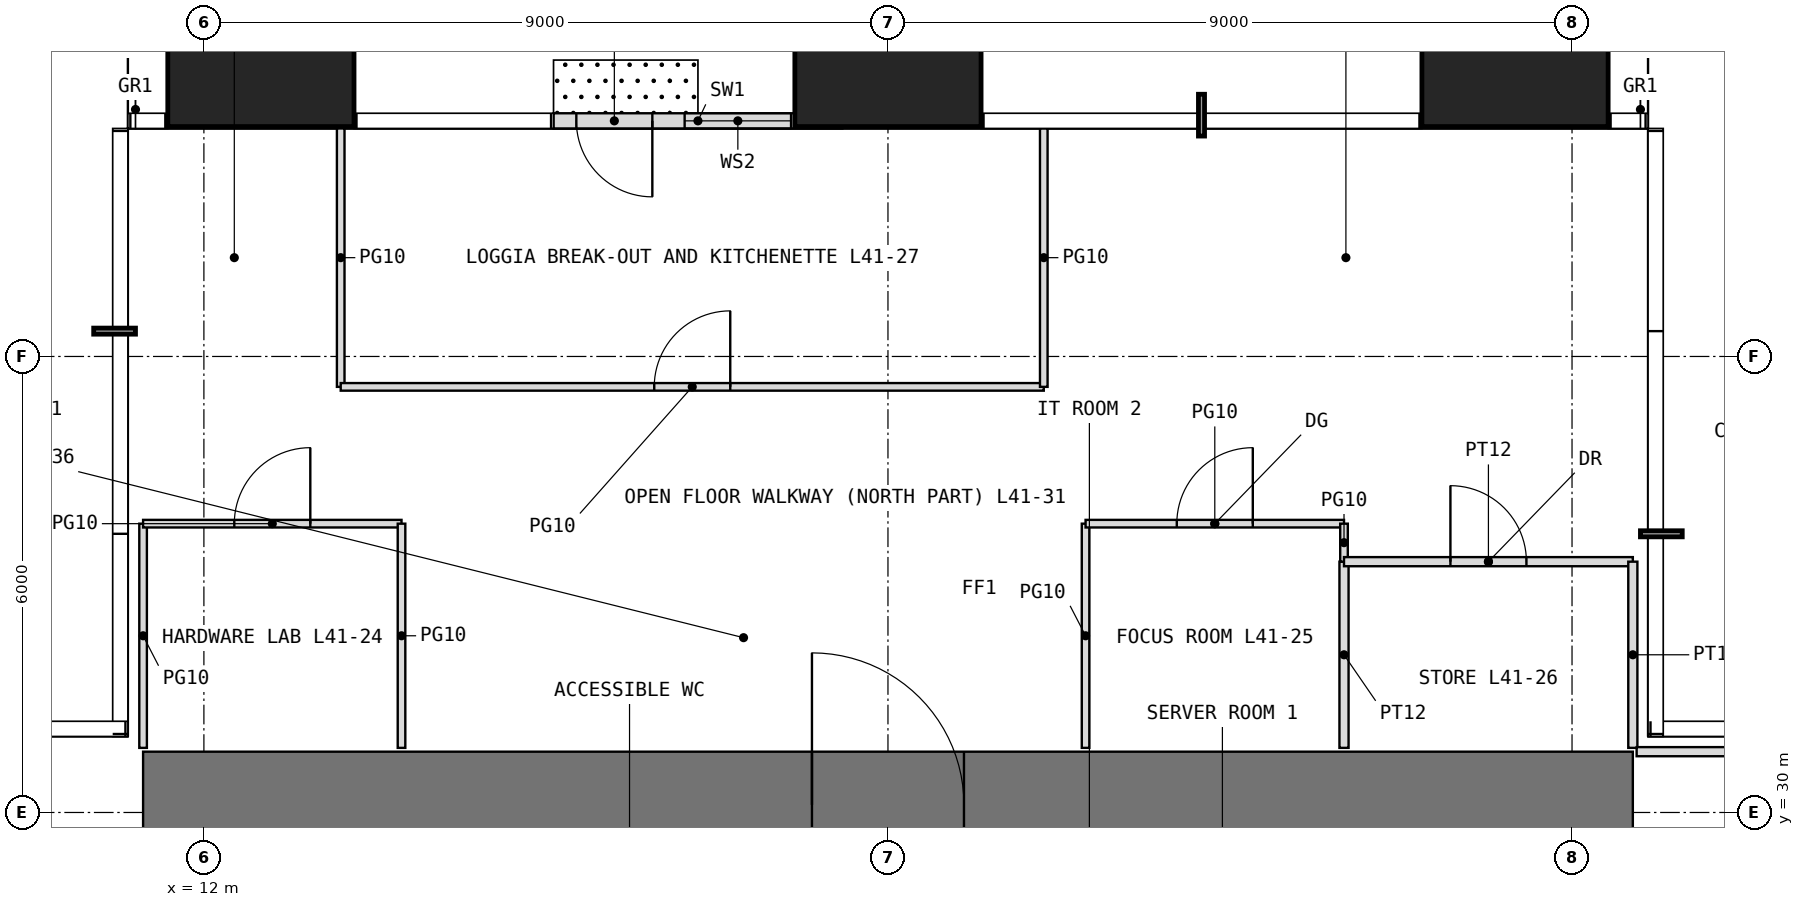
"""IFC4 building model, lengths in metres.
Left out: names, types, materials, properties, quantities, classifications, styles, units other than length and angle.
Written with IfcOpenShell. Run it as: python <this file> out.ifc"""

import sys

from ifc_helpers import new_model, si_unit, direction, frame, frame_2d, origin, origin_2d, place, context, subcontext, project, spatial, rectangle, extrude, element, fill, save


model = new_model("IFC4")
c1 = context("Model", 3, precision=1e-05, world=origin(), true_north=direction((0.0, 1.0)))
c2 = subcontext(c1, "Body", "Model", "MODEL_VIEW")
j1 = project(units=[si_unit("LENGTHUNIT", "METRE"), si_unit("PLANEANGLEUNIT", "RADIAN")], contexts=[c1])
p1 = place(None, origin())
s1 = spatial("IfcSite", under=j1, at=p1, CompositionType="ELEMENT")
p2 = place(p1, origin())
s2 = spatial("IfcBuilding", under=s1, at=p2, CompositionType="ELEMENT")
p3 = place(p2, frame((0.0, 0.0, 174.5)))
s3 = spatial("IfcBuildingStorey", under=s2, at=p3, CompositionType="ELEMENT", Elevation=174.5)
for number, where, z_axis, x_axis in (
    (1, (12.75, 40.25, 0.0), (0.0, 0.0, 1.0), (1.0, 0.0, 0.0)),
    (2, (21.0, 40.25, 0.0), (0.0, 0.0, 1.0), (1.0, 0.0, 0.0)),
    (3, (29.25, 40.25, 0.0), (0.0, 0.0, 1.0), (1.0, 0.0, 0.0)),
):
    element("IfcColumn", number, at=place(p3, frame(where, z_axis=z_axis, x_axis=x_axis)), inside=s3, PredefinedType="COLUMN", context=c2, shape_type="SweptSolid", body=[
        extrude(rectangle(XDim=2.45, YDim=2.45, at=origin_2d()), origin(), (0.0, 0.0, 1.0), 4.0),
    ])
p4 = place(p3, frame((20.4, 39.1, 0.0), z_axis=(0.0, 0.0, 1.0), x_axis=(-1.0, 0.0, 0.0)))
e4 = element("IfcWall", 4, at=p4, inside=s3, PredefinedType="USERDEFINED", context=c2, shape_type="SweptSolid", body=[
    extrude(rectangle(XDim=3.8, YDim=0.2, at=frame_2d((1.9, 0.0))), origin(), (0.0, 0.0, 1.0), 3.75),
])
p5 = place(p4, frame((2.5, 0.0, 0.0)))
e5 = element("IfcOpeningElement", 5, at=p5, cuts=e4, PredefinedType="OPENING", context=c2, shape_type="SweptSolid", body=[
    extrude(rectangle(XDim=1.0, YDim=2.4, at=frame_2d((0.5, 1.2))), frame((0.0, 0.11, 0.0), z_axis=(0.0, -1.0, 0.0), x_axis=(1.0, 0.0, 0.0)), (0.0, 0.0, 1.0), 0.22),
])
p6 = place(p4, frame((0.675, 0.0, 0.3)))
e6 = element("IfcOpeningElement", 6, at=p6, cuts=e4, PredefinedType="OPENING", context=c2, shape_type="SweptSolid", body=[
    extrude(rectangle(XDim=1.4, YDim=2.7, at=frame_2d((0.7, 1.35))), frame((0.0, 0.11, 0.0), z_axis=(0.0, -1.0, 0.0), x_axis=(1.0, 0.0, 0.0)), (0.0, 0.0, 1.0), 0.22),
])
p7 = place(p3, frame((11.2, 30.1, -0.05), z_axis=(0.0, 0.0, 1.0), x_axis=(1.0, 0.0, 0.0)))
e7 = element("IfcWall", 7, at=p7, inside=s3, PredefinedType="SHEAR", context=c2, shape_type="SweptSolid", body=[
    extrude(rectangle(XDim=19.6, YDim=1.4, at=frame_2d((9.8, 0.0))), origin(), (0.0, 0.0, 1.0), 4.0),
])
p8 = place(p7, frame((8.8, 0.0, 0.05)))
e8 = element("IfcOpeningElement", 8, at=p8, cuts=e7, PredefinedType="OPENING", context=c2, shape_type="SweptSolid", body=[
    extrude(rectangle(XDim=2.0, YDim=2.2, at=frame_2d((1.0, 1.1))), frame((0.0, 0.71, 0.0), z_axis=(0.0, -1.0, 0.0), x_axis=(1.0, 0.0, 0.0)), (0.0, 0.0, 1.0), 1.42),
])
p9 = place(p3, frame((11.2, 30.85, 0.0), z_axis=(0.0, 0.0, 1.0), x_axis=(0.0, 1.0, 0.0)))
e9 = element("IfcWall", 9, at=p9, inside=s3, PredefinedType="PARTITIONING", context=c2, shape_type="SweptSolid", body=[
    extrude(rectangle(XDim=2.95, YDim=0.1, at=frame_2d((1.475, 0.0))), origin(), (0.0, 0.0, 1.0), 3.75),
])
p10 = place(p3, frame((11.2, 33.8, 0.0), z_axis=(0.0, 0.0, 1.0), x_axis=(1.0, 0.0, 0.0)))
e10 = element("IfcWall", 10, at=p10, inside=s3, PredefinedType="PARTITIONING", context=c2, shape_type="SweptSolid", body=[
    extrude(rectangle(XDim=3.4, YDim=0.1, at=frame_2d((1.7, 0.0))), origin(), (0.0, 0.0, 1.0), 3.75),
])
p11 = place(p10, frame((1.2, 0.0, 0.0)))
e11 = element("IfcOpeningElement", 11, at=p11, cuts=e10, PredefinedType="OPENING", context=c2, shape_type="SweptSolid", body=[
    extrude(rectangle(XDim=1.0, YDim=2.4, at=frame_2d((0.5, 1.2))), frame((0.0, 0.06, 0.0), z_axis=(0.0, -1.0, 0.0), x_axis=(1.0, 0.0, 0.0)), (0.0, 0.0, 1.0), 0.12),
])
p12 = place(p3, frame((13.8, 35.6, 0.0), z_axis=(0.0, 0.0, 1.0), x_axis=(0.0, 1.0, 0.0)))
e12 = element("IfcWall", 12, at=p12, inside=s3, PredefinedType="PARTITIONING", context=c2, shape_type="SweptSolid", body=[
    extrude(rectangle(XDim=3.4, YDim=0.1, at=frame_2d((1.7, 0.0))), origin(), (0.0, 0.0, 1.0), 3.75),
])
p13 = place(p3, frame((13.8, 35.6, 0.0), z_axis=(0.0, 0.0, 1.0), x_axis=(1.0, 0.0, 0.0)))
e13 = element("IfcWall", 13, at=p13, inside=s3, PredefinedType="PARTITIONING", context=c2, shape_type="SweptSolid", body=[
    extrude(rectangle(XDim=9.25, YDim=0.1, at=frame_2d((4.625, 0.0))), origin(), (0.0, 0.0, 1.0), 3.75),
])
p14 = place(p13, frame((4.125, 0.0, 0.0)))
e14 = element("IfcOpeningElement", 14, at=p14, cuts=e13, PredefinedType="OPENING", context=c2, shape_type="SweptSolid", body=[
    extrude(rectangle(XDim=1.0, YDim=2.4, at=frame_2d((0.5, 1.2))), frame((0.0, 0.06, 0.0), z_axis=(0.0, -1.0, 0.0), x_axis=(1.0, 0.0, 0.0)), (0.0, 0.0, 1.0), 0.12),
])
p15 = place(p3, frame((14.6, 30.85, 0.0), z_axis=(0.0, 0.0, 1.0), x_axis=(0.0, 1.0, 0.0)))
e15 = element("IfcWall", 15, at=p15, inside=s3, PredefinedType="PARTITIONING", context=c2, shape_type="SweptSolid", body=[
    extrude(rectangle(XDim=2.95, YDim=0.1, at=frame_2d((1.475, 0.0))), origin(), (0.0, 0.0, 1.0), 3.75),
])
p16 = place(p3, frame((23.05, 35.6, 0.0), z_axis=(0.0, 0.0, 1.0), x_axis=(0.0, 1.0, 0.0)))
e16 = element("IfcWall", 16, at=p16, inside=s3, PredefinedType="PARTITIONING", context=c2, shape_type="SweptSolid", body=[
    extrude(rectangle(XDim=3.4, YDim=0.1, at=frame_2d((1.7, 0.0))), origin(), (0.0, 0.0, 1.0), 3.75),
])
p17 = place(p3, frame((23.6, 30.85, 0.0), z_axis=(0.0, 0.0, 1.0), x_axis=(0.0, 1.0, 0.0)))
e17 = element("IfcWall", 17, at=p17, inside=s3, PredefinedType="PARTITIONING", context=c2, shape_type="SweptSolid", body=[
    extrude(rectangle(XDim=2.95, YDim=0.1, at=frame_2d((1.475, 0.0))), origin(), (0.0, 0.0, 1.0), 3.75),
])
p18 = place(p3, frame((23.6, 33.8, 0.0), z_axis=(0.0, 0.0, 1.0), x_axis=(1.0, 0.0, 0.0)))
e18 = element("IfcWall", 18, at=p18, inside=s3, PredefinedType="PARTITIONING", context=c2, shape_type="SweptSolid", body=[
    extrude(rectangle(XDim=3.4, YDim=0.1, at=frame_2d((1.7, 0.0))), origin(), (0.0, 0.0, 1.0), 3.75),
])
p19 = place(p18, frame((1.2, 0.0, 0.0)))
e19 = element("IfcOpeningElement", 19, at=p19, cuts=e18, PredefinedType="OPENING", context=c2, shape_type="SweptSolid", body=[
    extrude(rectangle(XDim=1.0, YDim=2.4, at=frame_2d((0.5, 1.2))), frame((0.0, 0.06, 0.0), z_axis=(0.0, -1.0, 0.0), x_axis=(1.0, 0.0, 0.0)), (0.0, 0.0, 1.0), 0.12),
])
p20 = place(p3, frame((27.0, 30.85, 0.0), z_axis=(0.0, 0.0, 1.0), x_axis=(0.0, 1.0, 0.0)))
e20 = element("IfcWall", 20, at=p20, inside=s3, PredefinedType="PARTITIONING", context=c2, shape_type="SweptSolid", body=[
    extrude(rectangle(XDim=2.45, YDim=0.12, at=frame_2d((1.225, 0.0))), origin(), (0.0, 0.0, 1.0), 3.75),
])
p21 = place(p3, frame((27.0, 33.3, 0.0), z_axis=(0.0, 0.0, 1.0), x_axis=(0.0, 1.0, 0.0)))
e21 = element("IfcWall", 21, at=p21, inside=s3, PredefinedType="PARTITIONING", context=c2, shape_type="SweptSolid", body=[
    extrude(rectangle(XDim=0.5, YDim=0.1, at=frame_2d((0.25, 0.0))), origin(), (0.0, 0.0, 1.0), 3.75),
])
p22 = place(p3, frame((27.0, 33.3, 0.0), z_axis=(0.0, 0.0, 1.0), x_axis=(1.0, 0.0, 0.0)))
e22 = element("IfcWall", 22, at=p22, inside=s3, PredefinedType="PARTITIONING", context=c2, shape_type="SweptSolid", body=[
    extrude(rectangle(XDim=3.8, YDim=0.12, at=frame_2d((1.9, 0.0))), origin(), (0.0, 0.0, 1.0), 3.75),
])
p23 = place(p22, frame((1.4, 0.0, 0.0)))
e23 = element("IfcOpeningElement", 23, at=p23, cuts=e22, PredefinedType="OPENING", context=c2, shape_type="SweptSolid", body=[
    extrude(rectangle(XDim=1.0, YDim=2.2, at=frame_2d((0.5, 1.1))), frame((0.0, 0.07, 0.0), z_axis=(0.0, -1.0, 0.0), x_axis=(1.0, 0.0, 0.0)), (0.0, 0.0, 1.0), 0.14),
])
p24 = place(p3, frame((30.8, 30.85, 0.0), z_axis=(0.0, 0.0, 1.0), x_axis=(0.0, 1.0, 0.0)))
e24 = element("IfcWall", 24, at=p24, inside=s3, PredefinedType="PARTITIONING", context=c2, shape_type="SweptSolid", body=[
    extrude(rectangle(XDim=2.45, YDim=0.12, at=frame_2d((1.225, 0.0))), origin(), (0.0, 0.0, 1.0), 3.75),
])
p25 = place(p3, frame((30.85, 30.8, 0.0), z_axis=(0.0, 0.0, 1.0), x_axis=(1.0, 0.0, 0.0)))
e25 = element("IfcWall", 25, at=p25, inside=s3, PredefinedType="PARTITIONING", context=c2, shape_type="SweptSolid", body=[
    extrude(rectangle(XDim=4.85, YDim=0.12, at=frame_2d((2.425, 0.0))), origin(), (0.0, 0.0, 1.0), 3.75),
])
p26 = place(p5, origin())
e26 = element("IfcDoor", 26, at=p26, inside=s3, OperationType="SINGLE_SWING_LEFT", PredefinedType="DOOR", context=c2, shape_type="SweptSolid", body=[
    extrude(rectangle(XDim=1.0, YDim=2.4, at=frame_2d((0.5, 1.2))), frame((0.0, 0.025, 0.0), z_axis=(0.0, -1.0, 0.0), x_axis=(1.0, 0.0, 0.0)), (0.0, 0.0, 1.0), 0.05),
])
fill(e5, e26)
p27 = place(p6, origin())
e27 = element("IfcWindow", 27, at=p27, inside=s3, PartitioningType="SINGLE_PANEL", PredefinedType="WINDOW", context=c2, shape_type="SweptSolid", body=[
    extrude(rectangle(XDim=1.4, YDim=2.7, at=frame_2d((0.7, 1.35))), frame((0.0, 0.03, 0.0), z_axis=(0.0, -1.0, 0.0), x_axis=(1.0, 0.0, 0.0)), (0.0, 0.0, 1.0), 0.06),
])
fill(e6, e27)
p28 = place(p8, origin())
e28 = element("IfcDoor", 28, at=p28, inside=s3, OperationType="DOUBLE_DOOR_SINGLE_SWING", PredefinedType="DOOR", context=c2, shape_type="SweptSolid", body=[
    extrude(rectangle(XDim=2.0, YDim=2.2, at=frame_2d((1.0, 1.1))), frame((0.0, 0.025, 0.0), z_axis=(0.0, -1.0, 0.0), x_axis=(1.0, 0.0, 0.0)), (0.0, 0.0, 1.0), 0.05),
])
fill(e8, e28)
p29 = place(p11, origin())
e29 = element("IfcDoor", 29, at=p29, inside=s3, OperationType="SINGLE_SWING_RIGHT", PredefinedType="DOOR", context=c2, shape_type="SweptSolid", body=[
    extrude(rectangle(XDim=1.0, YDim=2.4, at=frame_2d((0.5, 1.2))), frame((0.0, 0.025, 0.0), z_axis=(0.0, -1.0, 0.0), x_axis=(1.0, 0.0, 0.0)), (0.0, 0.0, 1.0), 0.05),
])
fill(e11, e29)
p30 = place(p19, origin())
e30 = element("IfcDoor", 30, at=p30, inside=s3, OperationType="SINGLE_SWING_RIGHT", PredefinedType="DOOR", context=c2, shape_type="SweptSolid", body=[
    extrude(rectangle(XDim=1.0, YDim=2.4, at=frame_2d((0.5, 1.2))), frame((0.0, 0.025, 0.0), z_axis=(0.0, -1.0, 0.0), x_axis=(1.0, 0.0, 0.0)), (0.0, 0.0, 1.0), 0.05),
])
fill(e19, e30)
p31 = place(p23, origin())
e31 = element("IfcDoor", 31, at=p31, inside=s3, OperationType="SINGLE_SWING_LEFT", PredefinedType="DOOR", context=c2, shape_type="SweptSolid", body=[
    extrude(rectangle(XDim=1.0, YDim=2.2, at=frame_2d((0.5, 1.1))), frame((0.0, 0.025, 0.0), z_axis=(0.0, -1.0, 0.0), x_axis=(1.0, 0.0, 0.0)), (0.0, 0.0, 1.0), 0.05),
])
fill(e23, e31)
p32 = place(p14, origin())
e32 = element("IfcDoor", 32, at=p32, inside=s3, OperationType="SINGLE_SWING_RIGHT", PredefinedType="DOOR", context=c2, shape_type="SweptSolid", body=[
    extrude(rectangle(XDim=1.0, YDim=2.4, at=frame_2d((0.5, 1.2))), frame((0.0, 0.025, 0.0), z_axis=(0.0, -1.0, 0.0), x_axis=(1.0, 0.0, 0.0)), (0.0, 0.0, 1.0), 0.05),
])
fill(e14, e32)
save(model, sys.argv[1])
